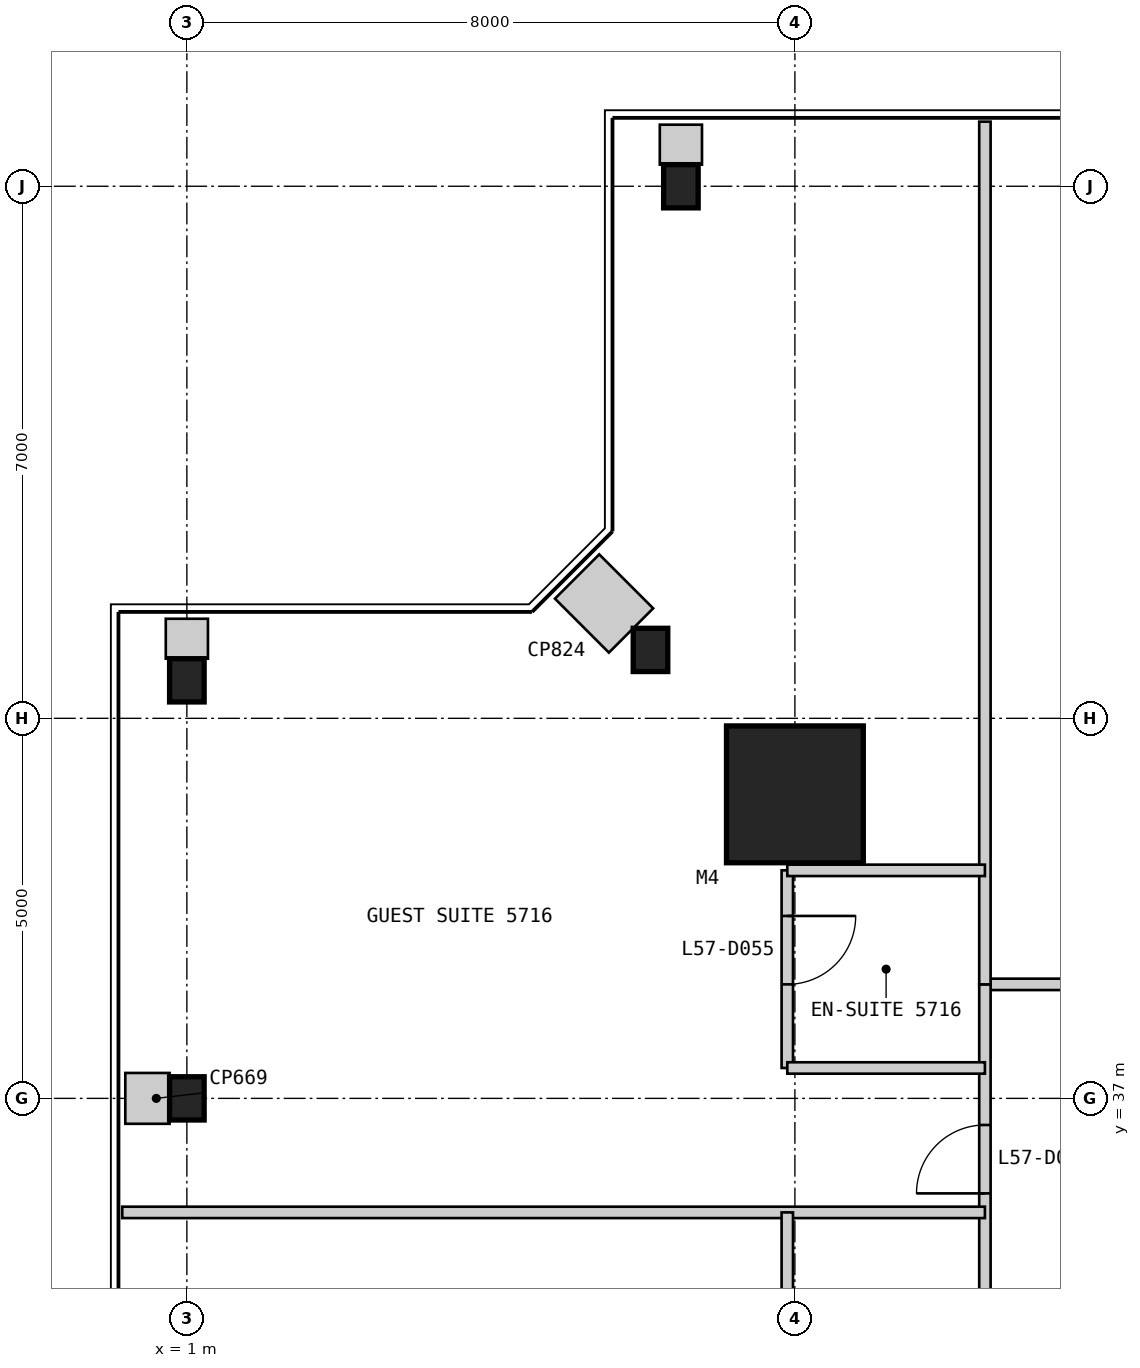
"""IFC4 building model, lengths in metres.
Left out: names, types, materials, properties, quantities, classifications, styles, units other than length and angle.
Written with IfcOpenShell. Run it as: python <this file> out.ifc"""

import sys

from ifc_helpers import new_model, si_unit, direction, frame, frame_2d, origin, origin_2d, place, context, subcontext, project, spatial, rectangle, i_section, extrude, element, fill, save


model = new_model("IFC4")
c1 = context("Model", 3, precision=1e-05, world=origin(), true_north=direction((0.0, 1.0)))
c2 = subcontext(c1, "Body", "Model", "MODEL_VIEW")
j1 = project(units=[si_unit("LENGTHUNIT", "METRE"), si_unit("PLANEANGLEUNIT", "RADIAN")], contexts=[c1])
p1 = place(None, origin())
s1 = spatial("IfcSite", under=j1, at=p1, CompositionType="ELEMENT")
p2 = place(p1, origin())
s2 = spatial("IfcBuilding", under=s1, at=p2, CompositionType="ELEMENT")
p3 = place(p2, frame((0.0, 0.0, 245.8)))
s3 = spatial("IfcBuildingStorey", under=s2, at=p3, CompositionType="ELEMENT", Elevation=245.8)
p4 = place(p3, frame((9.0, 41.0, 0.0), z_axis=(0.0, 0.0, 1.0), x_axis=(1.0, 0.0, 0.0)))
e1 = element("IfcColumn", 1, at=p4, inside=s3, PredefinedType="COLUMN", context=c2, shape_type="SweptSolid", body=[
    extrude(rectangle(XDim=1.8, YDim=1.8, at=origin_2d()), origin(), (0.0, 0.0, 1.0), 3.4),
])
for number, where, z_axis, x_axis in (
    (2, (7.5, 49.0, 0.0), (0.0, 0.0, 1.0), (1.0, 0.0, 0.0)),
    (3, (7.1, 42.9, 0.0), (0.0, 0.0, 1.0), (1.0, 0.0, 0.0)),
    (4, (1.0, 42.5, 0.0), (0.0, 0.0, 1.0), (1.0, 0.0, 0.0)),
    (5, (1.0, 37.0, 0.0), (0.0, 0.0, 1.0), (1.0, 0.0, 0.0)),
):
    element("IfcColumn", number, at=place(p3, frame(where, z_axis=z_axis, x_axis=x_axis)), inside=s3, PredefinedType="COLUMN", context=c2, shape_type="SweptSolid", body=[
        extrude(i_section(OverallWidth=0.455, OverallDepth=0.569, WebThickness=0.078, FlangeThickness=0.125, at=origin_2d()), origin(), (0.0, 0.0, 1.0), 3.4),
    ])
p5 = place(p3, frame((38.5, 38.5, 0.0), z_axis=(0.0, 0.0, 1.0), x_axis=(-1.0, 0.0, 0.0)))
e6 = element("IfcWall", 6, at=p5, inside=s3, PredefinedType="PARTITIONING", context=c2, shape_type="SweptSolid", body=[
    extrude(rectangle(XDim=27.0, YDim=0.15, at=frame_2d((13.5, 0.0))), origin(), (0.0, 0.0, 1.0), 3.25),
])
p6 = place(p5, frame((1.85, 0.0, 0.0)))
e7 = element("IfcOpeningElement", 7, at=p6, cuts=e6, PredefinedType="OPENING", context=c2, shape_type="SweptSolid", body=[
    extrude(rectangle(XDim=0.9, YDim=2.1, at=frame_2d((0.45, 1.05))), frame((0.0, 0.085, 0.0), z_axis=(0.0, -1.0, 0.0), x_axis=(1.0, 0.0, 0.0)), (0.0, 0.0, 1.0), 0.17),
])
p7 = place(p5, frame((6.2, 0.0, 0.0)))
e8 = element("IfcOpeningElement", 8, at=p7, cuts=e6, PredefinedType="OPENING", context=c2, shape_type="SweptSolid", body=[
    extrude(rectangle(XDim=0.9, YDim=2.1, at=frame_2d((0.45, 1.05))), frame((0.0, 0.085, 0.0), z_axis=(0.0, -1.0, 0.0), x_axis=(1.0, 0.0, 0.0)), (0.0, 0.0, 1.0), 0.17),
])
p8 = place(p5, frame((12.8, 0.0, 0.0)))
e9 = element("IfcOpeningElement", 9, at=p8, cuts=e6, PredefinedType="OPENING", context=c2, shape_type="SweptSolid", body=[
    extrude(rectangle(XDim=1.0, YDim=2.1, at=frame_2d((0.5, 1.05))), frame((0.0, 0.085, 0.0), z_axis=(0.0, -1.0, 0.0), x_axis=(1.0, 0.0, 0.0)), (0.0, 0.0, 1.0), 0.17),
])
p9 = place(p5, frame((18.2, 0.0, 0.0)))
e10 = element("IfcOpeningElement", 10, at=p9, cuts=e6, PredefinedType="OPENING", context=c2, shape_type="SweptSolid", body=[
    extrude(rectangle(XDim=0.9, YDim=2.1, at=frame_2d((0.45, 1.05))), frame((0.0, 0.085, 0.0), z_axis=(0.0, -1.0, 0.0), x_axis=(1.0, 0.0, 0.0)), (0.0, 0.0, 1.0), 0.17),
])
p10 = place(p5, frame((24.2, 0.0, 0.0)))
e11 = element("IfcOpeningElement", 11, at=p10, cuts=e6, PredefinedType="OPENING", context=c2, shape_type="SweptSolid", body=[
    extrude(rectangle(XDim=0.9, YDim=2.1, at=frame_2d((0.45, 1.05))), frame((0.0, 0.085, 0.0), z_axis=(0.0, -1.0, 0.0), x_axis=(1.0, 0.0, 0.0)), (0.0, 0.0, 1.0), 0.17),
])
p11 = place(p3, frame((11.5, 38.5, 0.0), z_axis=(0.0, 0.0, 1.0), x_axis=(0.0, -1.0, 0.0)))
e12 = element("IfcWall", 12, at=p11, inside=s3, PredefinedType="PARTITIONING", context=c2, shape_type="SweptSolid", body=[
    extrude(rectangle(XDim=27.0, YDim=0.15, at=frame_2d((13.5, 0.0))), origin(), (0.0, 0.0, 1.0), 3.25),
])
p12 = place(p11, frame((1.85, 0.0, 0.0)))
e13 = element("IfcOpeningElement", 13, at=p12, cuts=e12, PredefinedType="OPENING", context=c2, shape_type="SweptSolid", body=[
    extrude(rectangle(XDim=0.9, YDim=2.1, at=frame_2d((0.45, 1.05))), frame((0.0, 0.085, 0.0), z_axis=(0.0, -1.0, 0.0), x_axis=(1.0, 0.0, 0.0)), (0.0, 0.0, 1.0), 0.17),
])
p13 = place(p11, frame((6.2, 0.0, 0.0)))
e14 = element("IfcOpeningElement", 14, at=p13, cuts=e12, PredefinedType="OPENING", context=c2, shape_type="SweptSolid", body=[
    extrude(rectangle(XDim=0.9, YDim=2.1, at=frame_2d((0.45, 1.05))), frame((0.0, 0.085, 0.0), z_axis=(0.0, -1.0, 0.0), x_axis=(1.0, 0.0, 0.0)), (0.0, 0.0, 1.0), 0.17),
])
p14 = place(p11, frame((12.2, 0.0, 0.0)))
e15 = element("IfcOpeningElement", 15, at=p14, cuts=e12, PredefinedType="OPENING", context=c2, shape_type="SweptSolid", body=[
    extrude(rectangle(XDim=0.9, YDim=2.1, at=frame_2d((0.45, 1.05))), frame((0.0, 0.085, 0.0), z_axis=(0.0, -1.0, 0.0), x_axis=(1.0, 0.0, 0.0)), (0.0, 0.0, 1.0), 0.17),
])
p15 = place(p11, frame((18.2, 0.0, 0.0)))
e16 = element("IfcOpeningElement", 16, at=p15, cuts=e12, PredefinedType="OPENING", context=c2, shape_type="SweptSolid", body=[
    extrude(rectangle(XDim=0.9, YDim=2.1, at=frame_2d((0.45, 1.05))), frame((0.0, 0.085, 0.0), z_axis=(0.0, -1.0, 0.0), x_axis=(1.0, 0.0, 0.0)), (0.0, 0.0, 1.0), 0.17),
])
p16 = place(p11, frame((24.2, 0.0, 0.0)))
e17 = element("IfcOpeningElement", 17, at=p16, cuts=e12, PredefinedType="OPENING", context=c2, shape_type="SweptSolid", body=[
    extrude(rectangle(XDim=0.9, YDim=2.1, at=frame_2d((0.45, 1.05))), frame((0.0, 0.085, 0.0), z_axis=(0.0, -1.0, 0.0), x_axis=(1.0, 0.0, 0.0)), (0.0, 0.0, 1.0), 0.17),
])
p17 = place(p3, frame((11.5, 49.85, 0.0), z_axis=(0.0, 0.0, 1.0), x_axis=(0.0, -1.0, 0.0)))
e18 = element("IfcWall", 18, at=p17, inside=s3, PredefinedType="PARTITIONING", context=c2, shape_type="SweptSolid", body=[
    extrude(rectangle(XDim=11.35, YDim=0.15, at=frame_2d((5.675, 0.0))), origin(), (0.0, 0.0, 1.0), 3.25),
])
p18 = place(p3, frame((8.9, 40.0, 0.0), z_axis=(0.0, 0.0, 1.0), x_axis=(0.0, -1.0, 0.0)))
e19 = element("IfcWall", 19, at=p18, inside=s3, PredefinedType="PARTITIONING", context=c2, shape_type="SweptSolid", body=[
    extrude(rectangle(XDim=2.6, YDim=0.15, at=frame_2d((1.3, 0.0))), origin(), (0.0, 0.0, 1.0), 2.638),
])
p19 = place(p18, frame((0.6, 0.0, 0.0)))
e20 = element("IfcOpeningElement", 20, at=p19, cuts=e19, PredefinedType="OPENING", context=c2, shape_type="SweptSolid", body=[
    extrude(rectangle(XDim=0.9, YDim=2.1, at=frame_2d((0.45, 1.05))), frame((0.0, 0.085, 0.0), z_axis=(0.0, -1.0, 0.0), x_axis=(1.0, 0.0, 0.0)), (0.0, 0.0, 1.0), 0.17),
])
for number, where, z_axis, x_axis in (
    (21, (8.9, 40.0, 0.0), (0.0, 0.0, 1.0), (1.0, 0.0, 0.0)),
    (22, (8.9, 37.4, 0.0), (0.0, 0.0, 1.0), (1.0, 0.0, 0.0)),
):
    element("IfcWall", number, at=place(p3, frame(where, z_axis=z_axis, x_axis=x_axis)), inside=s3, PredefinedType="PARTITIONING", context=c2, shape_type="SweptSolid", body=[
        extrude(rectangle(XDim=2.6, YDim=0.15, at=frame_2d((1.3, 0.0))), origin(), (0.0, 0.0, 1.0), 3.25),
    ])
p20 = place(p3, frame((0.15, 35.5, 0.0), z_axis=(0.0, 0.0, 1.0), x_axis=(1.0, 0.0, 0.0)))
e23 = element("IfcWall", 23, at=p20, inside=s3, PredefinedType="PARTITIONING", context=c2, shape_type="SweptSolid", body=[
    extrude(rectangle(XDim=11.35, YDim=0.15, at=frame_2d((5.675, 0.0))), origin(), (0.0, 0.0, 1.0), 3.25),
])
p21 = place(p3, frame((8.9, 35.5, 0.0), z_axis=(0.0, 0.0, 1.0), x_axis=(0.0, -1.0, 0.0)))
e24 = element("IfcWall", 24, at=p21, inside=s3, PredefinedType="PARTITIONING", context=c2, shape_type="SweptSolid", body=[
    extrude(rectangle(XDim=2.6, YDim=0.15, at=frame_2d((1.3, 0.0))), origin(), (0.0, 0.0, 1.0), 3.25),
])
p22 = place(p3, frame((7.5, 49.81, 0.0), z_axis=(0.0, 0.0, 1.0), x_axis=(0.0, -1.0, 0.0)))
e25 = element("IfcWall", 25, at=p22, inside=s3, PredefinedType="PARTITIONING", context=c2, shape_type="SweptSolid", body=[
    extrude(rectangle(XDim=0.526, YDim=0.555, at=frame_2d((0.263, 0.0))), origin(), (0.0, 0.0, 1.0), 3.25),
])
p23 = place(p3, frame((6.134, 43.866, 0.0), z_axis=(0.0, 0.0, 1.0), x_axis=(0.707106781187, -0.707106781187, 0.0)))
e26 = element("IfcWall", 26, at=p23, inside=s3, PredefinedType="PARTITIONING", context=c2, shape_type="SweptSolid", body=[
    extrude(rectangle(XDim=1.004, YDim=0.824, at=frame_2d((0.502, 0.0))), origin(), (0.0, 0.0, 1.0), 3.25),
])
p24 = place(p3, frame((1.0, 43.31, 0.0), z_axis=(0.0, 0.0, 1.0), x_axis=(0.0, -1.0, 0.0)))
e27 = element("IfcWall", 27, at=p24, inside=s3, PredefinedType="PARTITIONING", context=c2, shape_type="SweptSolid", body=[
    extrude(rectangle(XDim=0.526, YDim=0.555, at=frame_2d((0.263, 0.0))), origin(), (0.0, 0.0, 1.0), 3.25),
])
p25 = place(p3, frame((0.19, 37.0, 0.0), z_axis=(0.0, 0.0, 1.0), x_axis=(1.0, 0.0, 0.0)))
e28 = element("IfcWall", 28, at=p25, inside=s3, PredefinedType="PARTITIONING", context=c2, shape_type="SweptSolid", body=[
    extrude(rectangle(XDim=0.583, YDim=0.669, at=frame_2d((0.292, 0.0))), origin(), (0.0, 0.0, 1.0), 3.25),
])
p26 = place(p12, frame((0.9, 0.0, 0.0), z_axis=(0.0, 0.0, 1.0), x_axis=(-1.0, 0.0, 0.0)))
e29 = element("IfcDoor", 29, at=p26, inside=s3, OperationType="SINGLE_SWING_LEFT", PredefinedType="DOOR", context=c2, shape_type="SweptSolid", body=[
    extrude(rectangle(XDim=0.9, YDim=2.1, at=frame_2d((0.45, 1.05))), frame((0.0, 0.025, 0.0), z_axis=(0.0, -1.0, 0.0), x_axis=(1.0, 0.0, 0.0)), (0.0, 0.0, 1.0), 0.05),
])
fill(e13, e29)
p27 = place(p19, origin())
e30 = element("IfcDoor", 30, at=p27, inside=s3, OperationType="SINGLE_SWING_LEFT", PredefinedType="DOOR", context=c2, shape_type="SweptSolid", body=[
    extrude(rectangle(XDim=0.9, YDim=2.1, at=frame_2d((0.45, 1.05))), frame((0.0, 0.025, 0.0), z_axis=(0.0, -1.0, 0.0), x_axis=(1.0, 0.0, 0.0)), (0.0, 0.0, 1.0), 0.05),
])
fill(e20, e30)
save(model, sys.argv[1])
